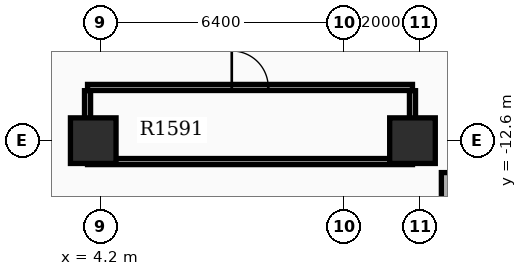
"""IFC4 building model, lengths in metres.
Left out: names, types, materials, properties, quantities, classifications, styles, units other than length and angle.
Written with IfcOpenShell. Run it as: python <this file> out.ifc"""

import sys

from ifc_helpers import new_model, si_unit, direction, frame, frame_2d, origin, origin_2d, place, context, subcontext, project, spatial, rectangle, extrude, element, fill, save


model = new_model("IFC4")
c1 = context("Model", 3, precision=1e-05, world=origin(), true_north=direction((0.0, 1.0)))
c2 = subcontext(c1, "Body", "Model", "MODEL_VIEW")
j1 = project(units=[si_unit("LENGTHUNIT", "METRE"), si_unit("PLANEANGLEUNIT", "RADIAN")], contexts=[c1])
p1 = place(None, origin())
s1 = spatial("IfcSite", under=j1, at=p1, CompositionType="ELEMENT")
p2 = place(p1, origin())
s2 = spatial("IfcBuilding", under=s1, at=p2, CompositionType="ELEMENT")
p3 = place(p2, frame((0.0, 0.0, 104.7)))
s3 = spatial("IfcBuildingStorey", under=s2, at=p3, CompositionType="ELEMENT", Elevation=104.7)
for number, where, z_axis, x_axis in (
    (1, (12.4, -12.6, 0.0), (0.0, 0.0, 1.0), (1.0, 0.0, 0.0)),
    (2, (4.0, -12.6, 0.0), (0.0, 0.0, 1.0), (1.0, 0.0, 0.0)),
):
    element("IfcColumn", number, at=place(p3, frame(where, z_axis=z_axis, x_axis=x_axis)), inside=s3, PredefinedType="COLUMN", context=c2, shape_type="SweptSolid", body=[
        extrude(rectangle(XDim=1.2, YDim=1.2, at=origin_2d()), origin(), (0.0, 0.0, 1.0), 3.9),
    ])
p4 = place(p3, frame((13.3, -13.44, 0.0), z_axis=(0.0, 0.0, 1.0), x_axis=(0.0, -1.0, 0.0)))
e3 = element("IfcWall", 3, at=p4, inside=s3, PredefinedType="STANDARD", context=c2, shape_type="SweptSolid", body=[
    extrude(rectangle(XDim=1.5, YDim=0.28, at=frame_2d((0.75, 0.0))), origin(), (0.0, 0.0, 1.0), 2.97),
])
p5 = place(p3, frame((3.85, -13.15, 0.0), z_axis=(0.0, 0.0, 1.0), x_axis=(1.0, 0.0, 0.0)))
e4 = element("IfcWall", 4, at=p5, inside=s3, PredefinedType="PARTITIONING", context=c2, shape_type="SweptSolid", body=[
    extrude(rectangle(XDim=8.55, YDim=0.16, at=frame_2d((4.275, 0.0))), origin(), (0.0, 0.0, 1.0), 2.96),
])
p6 = place(p3, frame((3.85, -11.2, 0.0), z_axis=(0.0, 0.0, 1.0), x_axis=(1.0, 0.0, 0.0)))
e5 = element("IfcWall", 5, at=p6, inside=s3, PredefinedType="PARTITIONING", context=c2, shape_type="SweptSolid", body=[
    extrude(rectangle(XDim=8.55, YDim=0.16, at=frame_2d((4.275, 0.0))), origin(), (0.0, 0.0, 1.0), 2.96),
])
p7 = place(p6, frame((3.795, 0.0, 0.0)))
e6 = element("IfcOpeningElement", 6, at=p7, cuts=e5, PredefinedType="OPENING", context=c2, shape_type="SweptSolid", body=[
    extrude(rectangle(XDim=0.96, YDim=2.15, at=frame_2d((0.48, 1.075))), frame((0.0, 0.09, 0.0), z_axis=(0.0, -1.0, 0.0), x_axis=(1.0, 0.0, 0.0)), (0.0, 0.0, 1.0), 0.18),
])
for number, where, z_axis, x_axis in (
    (7, (3.85, -13.065, 0.0), (0.0, 0.0, 1.0), (0.0, 1.0, 0.0)),
    (8, (12.4, -13.065, 0.0), (0.0, 0.0, 1.0), (0.0, 1.0, 0.0)),
):
    element("IfcWall", number, at=place(p3, frame(where, z_axis=z_axis, x_axis=x_axis)), inside=s3, PredefinedType="PARTITIONING", context=c2, shape_type="SweptSolid", body=[
        extrude(rectangle(XDim=1.78, YDim=0.16, at=frame_2d((0.89, 0.0))), origin(), (0.0, 0.0, 1.0), 2.96),
    ])
p8 = place(p7, origin())
e9 = element("IfcDoor", 9, at=p8, inside=s3, OperationType="SINGLE_SWING_LEFT", PredefinedType="DOOR", context=c2, shape_type="SweptSolid", body=[
    extrude(rectangle(XDim=0.96, YDim=2.15, at=frame_2d((0.48, 1.075))), frame((0.0, 0.025, 0.0), z_axis=(0.0, -1.0, 0.0), x_axis=(1.0, 0.0, 0.0)), (0.0, 0.0, 1.0), 0.05),
])
fill(e6, e9)
save(model, sys.argv[1])
